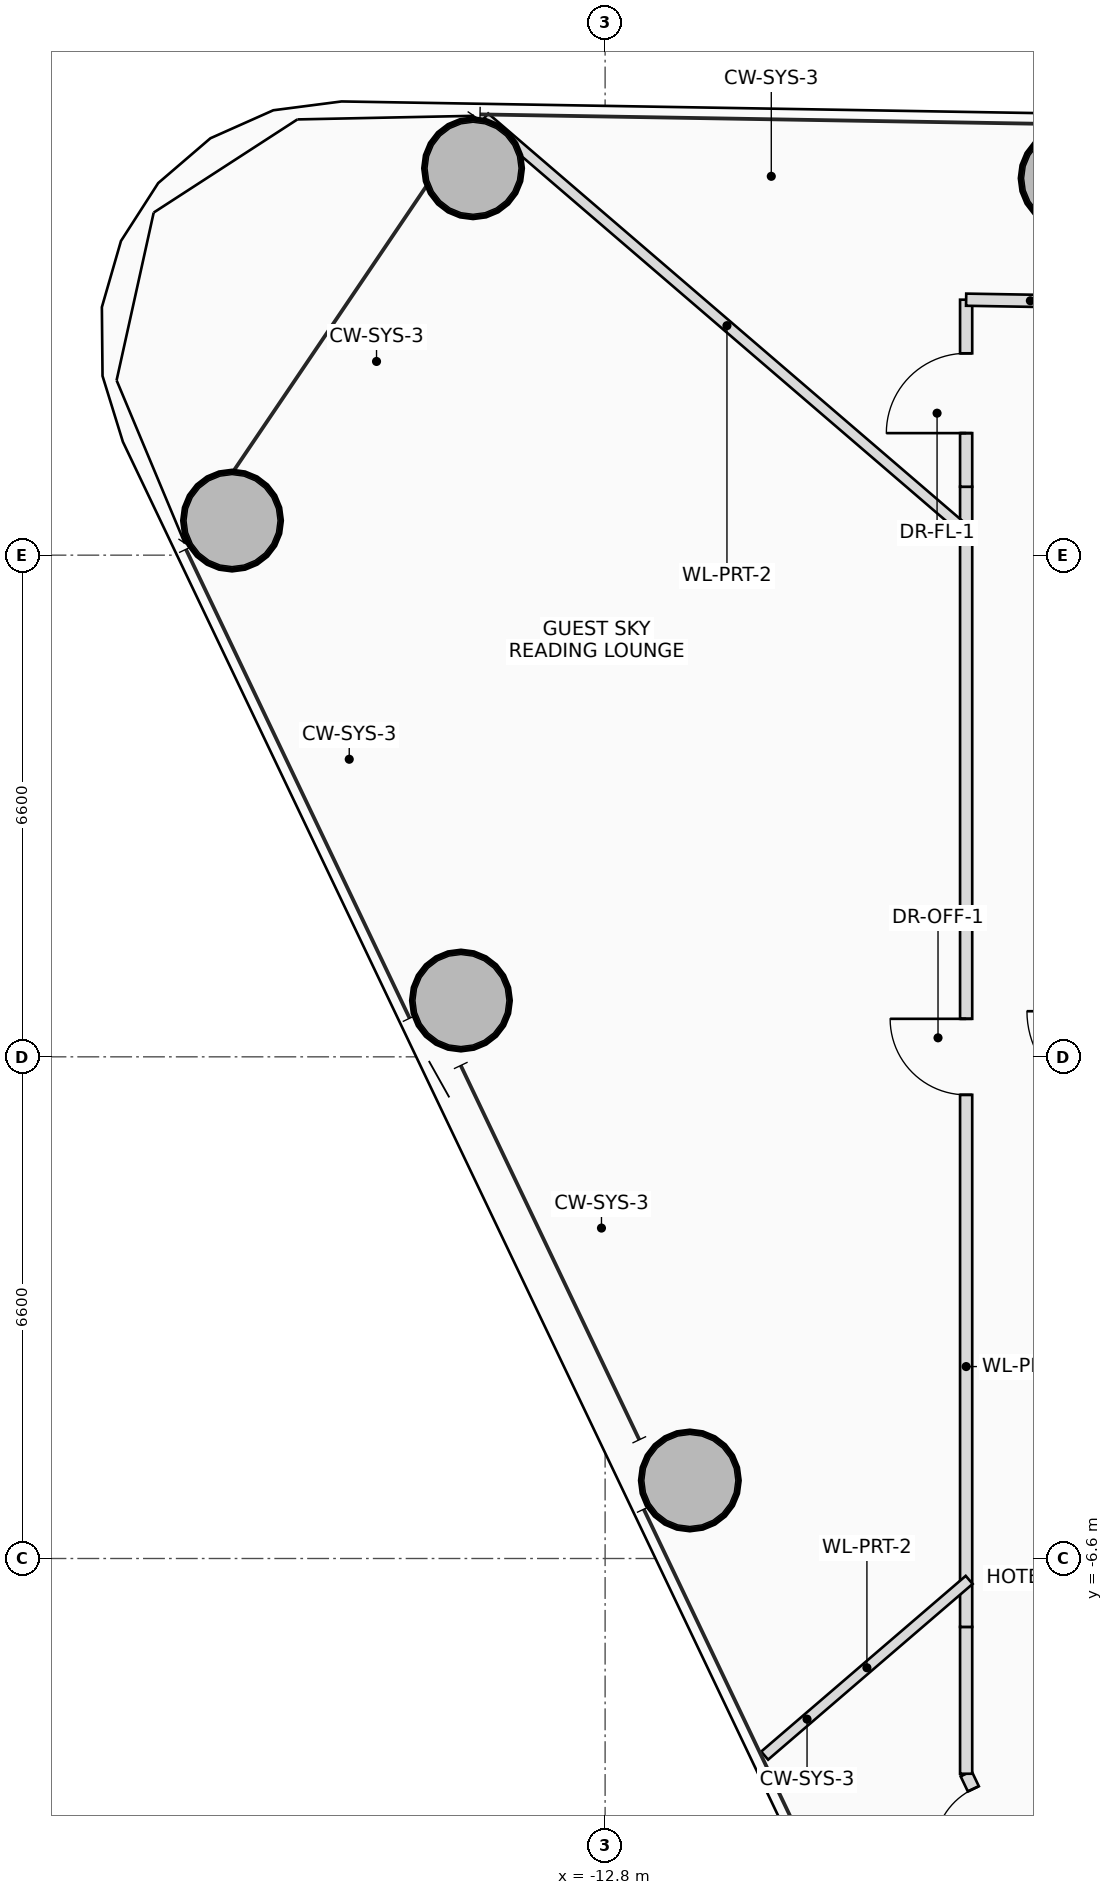
"""IFC4 building model, lengths in metres.
Left out: names, types, materials, properties, quantities, classifications, styles, units other than length and angle.
Written with IfcOpenShell. Run it as: python <this file> out.ifc"""

import sys

from ifc_helpers import new_model, si_unit, direction, frame, frame_2d, origin, origin_2d, place, context, subcontext, project, spatial, rectangle, hollow_circle, extrude, source, transform, mapped, element, fill, save


model = new_model("IFC4")
c1 = context("Model", 3, precision=1e-05, world=origin(), true_north=direction((0.0, 1.0)))
c2 = subcontext(c1, "Body", "Model", "MODEL_VIEW")
j1 = project(units=[si_unit("LENGTHUNIT", "METRE"), si_unit("PLANEANGLEUNIT", "RADIAN")], contexts=[c1])
p1 = place(None, origin())
s1 = spatial("IfcSite", under=j1, at=p1, CompositionType="ELEMENT")
p2 = place(p1, origin())
s2 = spatial("IfcBuilding", under=s1, at=p2, CompositionType="ELEMENT")
p3 = place(p2, frame((0.0, 0.0, 150.2)))
s3 = spatial("IfcBuildingStorey", under=s2, at=p3, CompositionType="ELEMENT", Elevation=150.2)
m1 = source(origin(), c2, "Body", "SweptSolid", [
    extrude(hollow_circle(Radius=0.65, WallThickness=0.045, at=origin_2d()), origin(), (0.0, 0.0, 1.0), 3.45),
])
for number, where, z_axis, x_axis in (
    (1, (-6.688, 11.558, 0.0), (0.0, 0.0, 1.0), (1.0, 0.0, 0.0)),
    (2, (-14.538, 11.69, 0.0), (0.0, 0.0, 1.0), (1.0, 0.0, 0.0)),
    (3, (-17.708, 7.055, 0.0), (0.0, 0.0, 1.0), (1.0, 0.0, 0.0)),
    (4, (-14.697, 0.74, 0.0), (0.0, 0.0, 1.0), (1.0, 0.0, 0.0)),
    (5, (-11.685, -5.573, 0.0), (0.0, 0.0, 1.0), (1.0, 0.0, 0.0)),
):
    element("IfcColumn", number, at=place(p3, frame(where, z_axis=z_axis, x_axis=x_axis)), inside=s3, PredefinedType="COLUMN", context=c2, shape_type="MappedRepresentation", body=[
        mapped(m1, transform((0.0, 0.0, 0.0), scale=1.0)),
    ])
p4 = place(p3, frame((-6.539, -12.6, 0.0), z_axis=(0.0, 0.0, 1.0), x_axis=(-0.430527444218, 0.902577486853, 0.0)))
e6 = element("IfcWall", 6, at=p4, inside=s3, PredefinedType="PARTITIONING", context=c2, shape_type="SweptSolid", body=[
    extrude(rectangle(XDim=3.51, YDim=0.16, at=frame_2d((1.755, 0.0))), origin(), (0.0, 0.0, 1.0), 2.565),
])
p5 = place(p4, frame((2.39, 0.0, 0.0)))
e7 = element("IfcOpeningElement", 7, at=p5, cuts=e6, PredefinedType="OPENING", context=c2, shape_type="SweptSolid", body=[
    extrude(rectangle(XDim=0.9, YDim=2.05, at=frame_2d((0.45, 1.025))), frame((0.0, 0.09, 0.0), z_axis=(0.0, -1.0, 0.0), x_axis=(1.0, 0.0, 0.0)), (0.0, 0.0, 1.0), 0.18),
])
p6 = place(p3, frame((-8.05, -9.432, 0.0), z_axis=(0.0, 0.0, 1.0), x_axis=(0.0, 1.0, 0.0)))
e8 = element("IfcWall", 8, at=p6, inside=s3, PredefinedType="PARTITIONING", context=c2, shape_type="SweptSolid", body=[
    extrude(rectangle(XDim=1.932, YDim=0.16, at=frame_2d((0.966, 0.0))), origin(), (0.0, 0.0, 1.0), 2.765),
])
p7 = place(p3, frame((-8.05, -7.5, 0.0), z_axis=(0.0, 0.0, 1.0), x_axis=(0.0, 1.0, 0.0)))
e9 = element("IfcWall", 9, at=p7, inside=s3, PredefinedType="PARTITIONING", context=c2, shape_type="SweptSolid", body=[
    extrude(rectangle(XDim=15.0, YDim=0.16, at=frame_2d((7.5, 0.0))), origin(), (0.0, 0.0, 1.0), 2.565),
])
p8 = place(p7, frame((7.0, 0.0, 0.0)))
e10 = element("IfcOpeningElement", 10, at=p8, cuts=e9, PredefinedType="OPENING", context=c2, shape_type="SweptSolid", body=[
    extrude(rectangle(XDim=1.0, YDim=2.25, at=frame_2d((0.5, 1.125))), frame((0.0, 0.09, 0.0), z_axis=(0.0, -1.0, 0.0), x_axis=(1.0, 0.0, 0.0)), (0.0, 0.0, 1.0), 0.18),
])
p9 = place(p3, frame((-8.05, 7.5, 0.0), z_axis=(0.0, 0.0, 1.0), x_axis=(0.0, 1.0, 0.0)))
e11 = element("IfcWall", 11, at=p9, inside=s3, PredefinedType="PARTITIONING", context=c2, shape_type="SweptSolid", body=[
    extrude(rectangle(XDim=2.461, YDim=0.16, at=frame_2d((1.23, 0.0))), origin(), (0.0, 0.0, 1.0), 2.765),
])
p10 = place(p9, frame((0.706, 0.0, 0.0)))
e12 = element("IfcOpeningElement", 12, at=p10, cuts=e11, PredefinedType="OPENING", context=c2, shape_type="SweptSolid", body=[
    extrude(rectangle(XDim=1.05, YDim=2.2, at=frame_2d((0.525, 1.1))), frame((0.0, 0.09, 0.0), z_axis=(0.0, -1.0, 0.0), x_axis=(1.0, 0.0, 0.0)), (0.0, 0.0, 1.0), 0.18),
])
p11 = place(p3, frame((-8.05, 9.961, 0.0), z_axis=(0.0, 0.0, 1.0), x_axis=(0.999859611566, -0.016755809729, 0.0)))
e13 = element("IfcWall", 13, at=p11, inside=s3, PredefinedType="PARTITIONING", context=c2, shape_type="SweptSolid", body=[
    extrude(rectangle(XDim=1.69, YDim=0.16, at=frame_2d((0.845, 0.0))), origin(), (0.0, 0.0, 1.0), 2.565),
])
p12 = place(p3, frame((-8.01, 6.882, 0.0), z_axis=(0.0, 0.0, 1.0), x_axis=(-0.758515743862, 0.651654714026, 0.0)))
e14 = element("IfcWall", 14, at=p12, inside=s3, PredefinedType="PARTITIONING", context=c2, shape_type="SweptSolid", body=[
    extrude(rectangle(XDim=8.403, YDim=0.14, at=frame_2d((4.202, 0.0))), origin(), (0.0, 0.0, 1.0), 2.565),
])
p13 = place(p3, frame((-8.01, -6.882, 0.0), z_axis=(0.0, 0.0, 1.0), x_axis=(-0.75852259091, -0.651646744087, 0.0)))
e15 = element("IfcWall", 15, at=p13, inside=s3, PredefinedType="PARTITIONING", context=c2, shape_type="SweptSolid", body=[
    extrude(rectangle(XDim=3.548, YDim=0.14, at=frame_2d((1.774, 0.0))), origin(), (0.0, 0.0, 1.0), 2.725),
])
p14 = place(p5, origin())
e16 = element("IfcDoor", 16, at=p14, inside=s3, OperationType="SINGLE_SWING_LEFT", PredefinedType="DOOR", context=c2, shape_type="SweptSolid", body=[
    extrude(rectangle(XDim=0.9, YDim=2.05, at=frame_2d((0.45, 1.025))), frame((0.0, 0.025, 0.0), z_axis=(0.0, -1.0, 0.0), x_axis=(1.0, 0.0, 0.0)), (0.0, 0.0, 1.0), 0.05),
])
fill(e7, e16)
p15 = place(p8, origin())
e17 = element("IfcDoor", 17, at=p15, inside=s3, OperationType="SINGLE_SWING_RIGHT", PredefinedType="DOOR", context=c2, shape_type="SweptSolid", body=[
    extrude(rectangle(XDim=1.0, YDim=2.25, at=frame_2d((0.5, 1.125))), frame((0.0, 0.025, 0.0), z_axis=(0.0, -1.0, 0.0), x_axis=(1.0, 0.0, 0.0)), (0.0, 0.0, 1.0), 0.05),
])
fill(e10, e17)
p16 = place(p10, origin())
e18 = element("IfcDoor", 18, at=p16, inside=s3, OperationType="SINGLE_SWING_LEFT", PredefinedType="DOOR", context=c2, shape_type="SweptSolid", body=[
    extrude(rectangle(XDim=1.05, YDim=2.2, at=frame_2d((0.525, 1.1))), frame((0.0, 0.025, 0.0), z_axis=(0.0, -1.0, 0.0), x_axis=(1.0, 0.0, 0.0)), (0.0, 0.0, 1.0), 0.05),
])
fill(e12, e18)
save(model, sys.argv[1])
